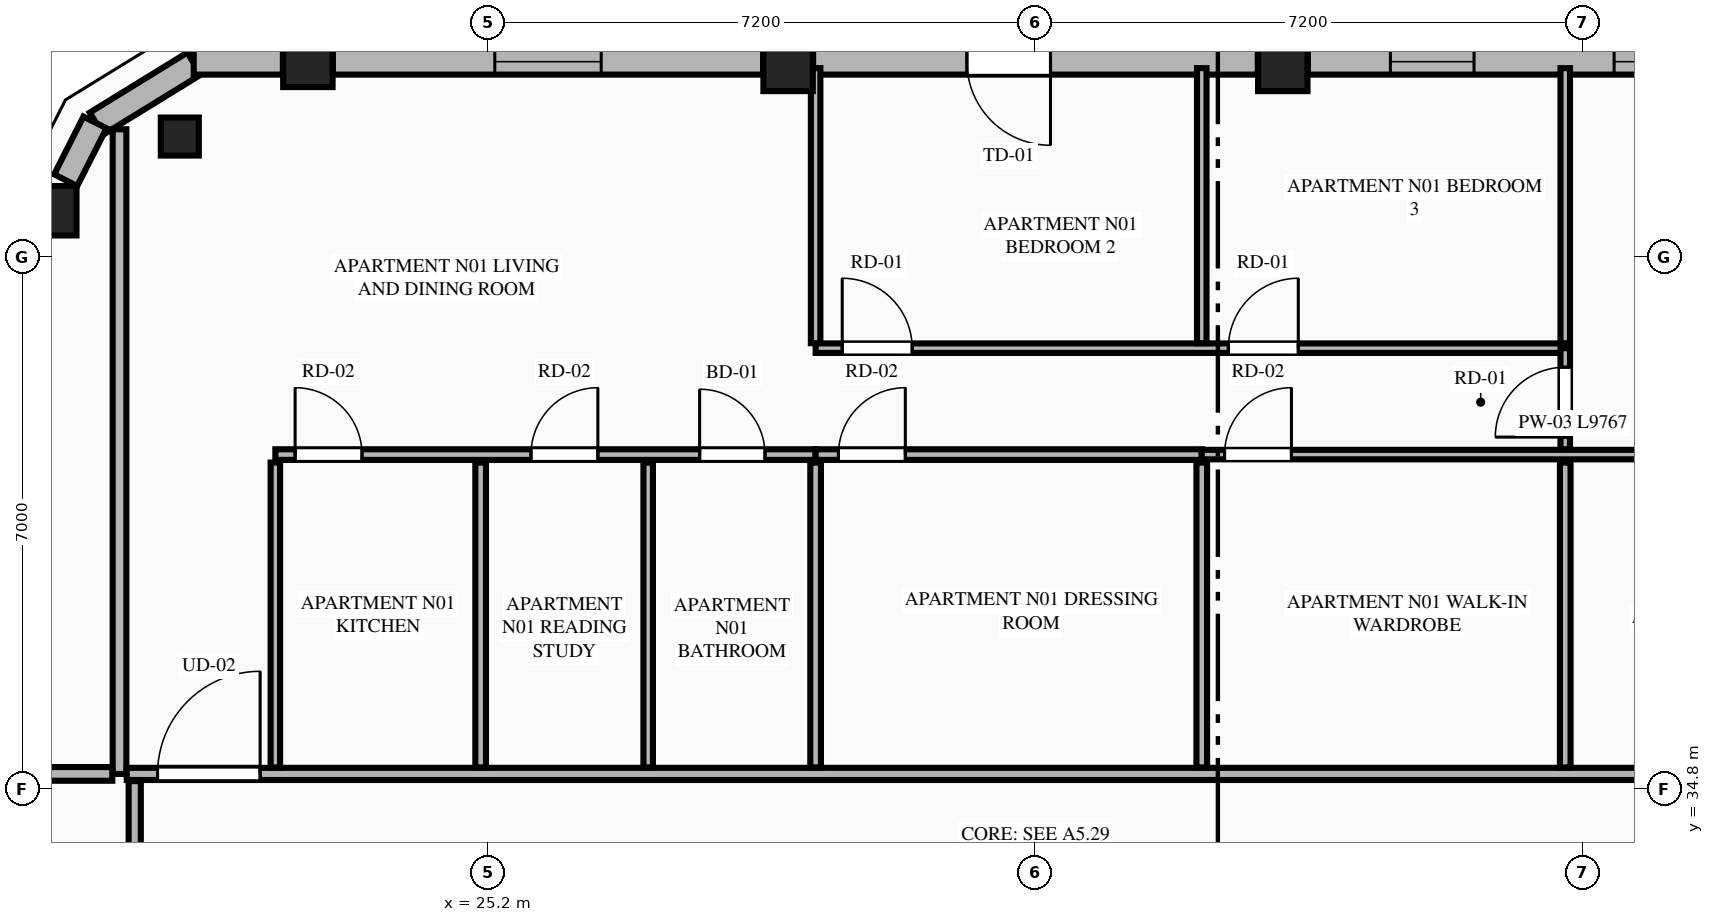
"""IFC4 building model, lengths in metres.
Left out: names, types, materials, properties, quantities, classifications, styles, units other than length and angle.
Written with IfcOpenShell. Run it as: python <this file> out.ifc"""

import sys

from ifc_helpers import new_model, si_unit, direction, frame, frame_2d, origin, origin_2d, place, context, subcontext, project, spatial, rectangle, extrude, element, fill, save


model = new_model("IFC4")
c1 = context("Model", 3, precision=1e-05, world=origin(), true_north=direction((0.0, 1.0)))
c2 = subcontext(c1, "Body", "Model", "MODEL_VIEW")
j1 = project(units=[si_unit("LENGTHUNIT", "METRE"), si_unit("PLANEANGLEUNIT", "RADIAN")], contexts=[c1])
p1 = place(None, origin())
s1 = spatial("IfcSite", under=j1, at=p1, CompositionType="ELEMENT")
p2 = place(p1, origin())
s2 = spatial("IfcBuilding", under=s1, at=p2, CompositionType="ELEMENT")
p3 = place(p2, frame((0.0, 0.0, 263.5)))
s3 = spatial("IfcBuildingStorey", under=s2, at=p3, CompositionType="ELEMENT", Elevation=263.5)
for number, where, z_axis, x_axis in (
    (1, (35.654, 44.308, 0.0), (0.0, 0.0, 1.0), (1.0, 0.0, 0.0)),
    (2, (29.146, 44.308, 0.0), (0.0, 0.0, 1.0), (1.0, 0.0, 0.0)),
    (3, (22.828, 44.361, 0.0), (0.0, 0.0, 1.0), (1.0, 0.0, 0.0)),
    (4, (19.459, 42.409, 0.0), (0.0, 0.0, 1.0), (1.0, 0.0, 0.0)),
):
    element("IfcColumn", number, at=place(p3, frame(where, z_axis=z_axis, x_axis=x_axis)), inside=s3, PredefinedType="COLUMN", context=c2, shape_type="SweptSolid", body=[
        extrude(rectangle(XDim=0.65, YDim=0.65, at=origin_2d()), origin(), (0.0, 0.0, 1.0), 3.65),
    ])
p4 = place(p3, frame((21.143, 43.385, 0.0), z_axis=(0.0, 0.0, 1.0), x_axis=(-0.865256437757, -0.501329529272, 0.0)))
e5 = element("IfcColumn", 5, at=p4, inside=s3, PredefinedType="PILASTER", context=c2, shape_type="SweptSolid", body=[
    extrude(rectangle(XDim=0.5, YDim=0.35, at=origin_2d()), origin(), (0.0, 0.0, 1.0), 3.65),
])
p5 = place(p3, frame((21.331, 44.345, 0.0), z_axis=(0.0, 0.0, 1.0), x_axis=(-0.851680557619, -0.52406128246, 0.0)))
e6 = element("IfcWall", 6, at=p5, inside=s3, PredefinedType="STANDARD", context=c2, shape_type="SweptSolid", body=[
    extrude(rectangle(XDim=1.508, YDim=0.34, at=frame_2d((0.754, 0.0))), origin(), (0.0, 0.0, 1.0), 3.45),
])
p6 = place(p3, frame((41.643, 44.37, 0.0), z_axis=(0.0, 0.0, 1.0), x_axis=(-1.0, 0.0, 0.0)))
e7 = element("IfcWall", 7, at=p6, inside=s3, PredefinedType="STANDARD", context=c2, shape_type="SweptSolid", body=[
    extrude(rectangle(XDim=5.66, YDim=0.34, at=frame_2d((2.83, 0.0))), origin(), (0.0, 0.0, 1.0), 2.983),
])
p7 = place(p6, frame((0.53, 0.0, 0.75)))
e8 = element("IfcOpeningElement", 8, at=p7, cuts=e7, PredefinedType="OPENING", context=c2, shape_type="SweptSolid", body=[
    extrude(rectangle(XDim=1.1, YDim=2.0, at=frame_2d((0.55, 1.0))), frame((0.0, 0.18, 0.0), z_axis=(0.0, -1.0, 0.0), x_axis=(1.0, 0.0, 0.0)), (0.0, 0.0, 1.0), 0.36),
])
p8 = place(p6, frame((3.473, 0.0, 0.75)))
e9 = element("IfcOpeningElement", 9, at=p8, cuts=e7, PredefinedType="OPENING", context=c2, shape_type="SweptSolid", body=[
    extrude(rectangle(XDim=1.1, YDim=2.0, at=frame_2d((0.55, 1.0))), frame((0.0, 0.18, 0.0), z_axis=(0.0, -1.0, 0.0), x_axis=(1.0, 0.0, 0.0)), (0.0, 0.0, 1.0), 0.36),
])
p9 = place(p3, frame((35.325, 44.37, 0.0), z_axis=(0.0, 0.0, 1.0), x_axis=(-1.0, 0.0, 0.0)))
e10 = element("IfcWall", 10, at=p9, inside=s3, PredefinedType="STANDARD", context=c2, shape_type="SweptSolid", body=[
    extrude(rectangle(XDim=5.85, YDim=0.34, at=frame_2d((2.925, 0.0))), origin(), (0.0, 0.0, 1.0), 2.983),
])
p10 = place(p9, frame((2.727, 0.0, 0.0)))
e11 = element("IfcOpeningElement", 11, at=p10, cuts=e10, PredefinedType="OPENING", context=c2, shape_type="SweptSolid", body=[
    extrude(rectangle(XDim=1.1, YDim=2.25, at=frame_2d((0.55, 1.125))), frame((0.0, 0.18, 0.0), z_axis=(0.0, -1.0, 0.0), x_axis=(1.0, 0.0, 0.0)), (0.0, 0.0, 1.0), 0.36),
])
p11 = place(p3, frame((28.817, 44.37, 0.0), z_axis=(0.0, 0.0, 1.0), x_axis=(-1.0, 0.0, 0.0)))
e12 = element("IfcWall", 12, at=p11, inside=s3, PredefinedType="STANDARD", context=c2, shape_type="SweptSolid", body=[
    extrude(rectangle(XDim=5.66, YDim=0.34, at=frame_2d((2.83, 0.0))), origin(), (0.0, 0.0, 1.0), 2.983),
])
p12 = place(p11, frame((2.13, 0.0, 0.75)))
e13 = element("IfcOpeningElement", 13, at=p12, cuts=e12, PredefinedType="OPENING", context=c2, shape_type="SweptSolid", body=[
    extrude(rectangle(XDim=1.4, YDim=2.05, at=frame_2d((0.7, 1.025))), frame((0.0, 0.18, 0.0), z_axis=(0.0, -1.0, 0.0), x_axis=(1.0, 0.0, 0.0)), (0.0, 0.0, 1.0), 0.36),
])
p13 = place(p3, frame((22.499, 44.37, 0.0), z_axis=(0.0, 0.0, 1.0), x_axis=(-1.0, 0.0, 0.0)))
e14 = element("IfcWall", 14, at=p13, inside=s3, PredefinedType="STANDARD", context=c2, shape_type="SweptSolid", body=[
    extrude(rectangle(XDim=1.173, YDim=0.34, at=frame_2d((0.586, 0.0))), origin(), (0.0, 0.0, 1.0), 3.45),
])
p14 = place(p3, frame((20.027, 43.571, 0.0), z_axis=(0.0, 0.0, 1.0), x_axis=(-0.451907025977, -0.8920650424, 0.0)))
e15 = element("IfcWall", 15, at=p14, inside=s3, PredefinedType="STANDARD", context=c2, shape_type="SweptSolid", body=[
    extrude(rectangle(XDim=0.852, YDim=0.34, at=frame_2d((0.426, 0.0))), origin(), (0.0, 0.0, 1.0), 3.45),
])
p15 = place(p3, frame((20.35, 35.0, 0.0), z_axis=(0.0, 0.0, 1.0), x_axis=(0.0, 1.0, 0.0)))
e16 = element("IfcWall", 16, at=p15, inside=s3, PredefinedType="PARTITIONING", context=c2, shape_type="SweptSolid", body=[
    extrude(rectangle(XDim=8.481, YDim=0.18, at=frame_2d((4.24, 0.0))), origin(), (0.0, 0.0, 1.0), 3.45),
])
p16 = place(p3, frame((20.445, 35.0, 0.0), z_axis=(0.0, 0.0, 1.0), x_axis=(1.0, 0.0, 0.0)))
e17 = element("IfcWall", 17, at=p16, inside=s3, PredefinedType="PARTITIONING", context=c2, shape_type="SweptSolid", body=[
    extrude(rectangle(XDim=23.91, YDim=0.16, at=frame_2d((11.955, 0.0))), origin(), (0.0, 0.0, 1.0), 3.45),
])
p17 = place(p16, frame((0.405, 0.0, 0.0)))
e18 = element("IfcOpeningElement", 18, at=p17, cuts=e17, PredefinedType="OPENING", context=c2, shape_type="SweptSolid", body=[
    extrude(rectangle(XDim=1.35, YDim=2.35, at=frame_2d((0.675, 1.175))), frame((0.0, 0.09, 0.0), z_axis=(0.0, -1.0, 0.0), x_axis=(1.0, 0.0, 0.0)), (0.0, 0.0, 1.0), 0.18),
])
p18 = place(p3, frame((22.4, 35.085, 0.0), z_axis=(0.0, 0.0, 1.0), x_axis=(0.0, 1.0, 0.0)))
e19 = element("IfcWall", 19, at=p18, inside=s3, PredefinedType="PARTITIONING", context=c2, shape_type="SweptSolid", body=[
    extrude(rectangle(XDim=4.011, YDim=0.125, at=frame_2d((2.005, 0.0))), origin(), (0.0, 0.0, 1.0), 3.45),
])
p19 = place(p3, frame((22.4, 39.201, 0.0), z_axis=(0.0, 0.0, 1.0), x_axis=(1.0, 0.0, 0.0)))
e20 = element("IfcWall", 20, at=p19, inside=s3, PredefinedType="PLUMBINGWALL", context=c2, shape_type="SweptSolid", body=[
    extrude(rectangle(XDim=7.108, YDim=0.14, at=frame_2d((3.554, 0.0))), origin(), (0.0, 0.0, 1.0), 3.45),
])
p20 = place(p19, frame((5.582, 0.0, 0.0)))
e21 = element("IfcOpeningElement", 21, at=p20, cuts=e20, PredefinedType="OPENING", context=c2, shape_type="SweptSolid", body=[
    extrude(rectangle(XDim=0.86, YDim=2.1, at=frame_2d((0.43, 1.05))), frame((0.0, 0.08, 0.0), z_axis=(0.0, -1.0, 0.0), x_axis=(1.0, 0.0, 0.0)), (0.0, 0.0, 1.0), 0.16),
])
p21 = place(p19, frame((0.26, 0.0, 0.0)))
e22 = element("IfcOpeningElement", 22, at=p21, cuts=e20, PredefinedType="OPENING", context=c2, shape_type="SweptSolid", body=[
    extrude(rectangle(XDim=0.88, YDim=2.15, at=frame_2d((0.44, 1.075))), frame((0.0, 0.08, 0.0), z_axis=(0.0, -1.0, 0.0), x_axis=(1.0, 0.0, 0.0)), (0.0, 0.0, 1.0), 0.16),
])
p22 = place(p19, frame((3.363, 0.0, 0.0)))
e23 = element("IfcOpeningElement", 23, at=p22, cuts=e20, PredefinedType="OPENING", context=c2, shape_type="SweptSolid", body=[
    extrude(rectangle(XDim=0.88, YDim=2.15, at=frame_2d((0.44, 1.075))), frame((0.0, 0.08, 0.0), z_axis=(0.0, -1.0, 0.0), x_axis=(1.0, 0.0, 0.0)), (0.0, 0.0, 1.0), 0.16),
])
p23 = place(p3, frame((29.508, 39.201, 0.0), z_axis=(0.0, 0.0, 1.0), x_axis=(1.0, 0.0, 0.0)))
e24 = element("IfcWall", 24, at=p23, inside=s3, PredefinedType="PLUMBINGWALL", context=c2, shape_type="SweptSolid", body=[
    extrude(rectangle(XDim=5.08, YDim=0.14, at=frame_2d((2.54, 0.0))), origin(), (0.0, 0.0, 1.0), 3.45),
])
p24 = place(p23, frame((0.3, 0.0, 0.0)))
e25 = element("IfcOpeningElement", 25, at=p24, cuts=e24, PredefinedType="OPENING", context=c2, shape_type="SweptSolid", body=[
    extrude(rectangle(XDim=0.88, YDim=2.15, at=frame_2d((0.44, 1.075))), frame((0.0, 0.08, 0.0), z_axis=(0.0, -1.0, 0.0), x_axis=(1.0, 0.0, 0.0)), (0.0, 0.0, 1.0), 0.16),
])
p25 = place(p3, frame((34.588, 39.201, 0.0), z_axis=(0.0, 0.0, 1.0), x_axis=(1.0, 0.0, 0.0)))
e26 = element("IfcWall", 26, at=p25, inside=s3, PredefinedType="PARTITIONING", context=c2, shape_type="SweptSolid", body=[
    extrude(rectangle(XDim=9.767, YDim=0.125, at=frame_2d((4.884, 0.0))), origin(), (0.0, 0.0, 1.0), 3.45),
])
p26 = place(p25, frame((6.849, 0.0, 0.0)))
e27 = element("IfcOpeningElement", 27, at=p26, cuts=e26, PredefinedType="OPENING", context=c2, shape_type="SweptSolid", body=[
    extrude(rectangle(XDim=0.86, YDim=2.1, at=frame_2d((0.43, 1.05))), frame((0.0, 0.073, 0.0), z_axis=(0.0, -1.0, 0.0), x_axis=(1.0, 0.0, 0.0)), (0.0, 0.0, 1.0), 0.145),
])
p27 = place(p25, frame((0.3, 0.0, 0.0)))
e28 = element("IfcOpeningElement", 28, at=p27, cuts=e26, PredefinedType="OPENING", context=c2, shape_type="SweptSolid", body=[
    extrude(rectangle(XDim=0.88, YDim=2.15, at=frame_2d((0.44, 1.075))), frame((0.0, 0.073, 0.0), z_axis=(0.0, -1.0, 0.0), x_axis=(1.0, 0.0, 0.0)), (0.0, 0.0, 1.0), 0.145),
])
p28 = place(p3, frame((25.101, 35.085, 0.0), z_axis=(0.0, 0.0, 1.0), x_axis=(0.0, 1.0, 0.0)))
e29 = element("IfcWall", 29, at=p28, inside=s3, PredefinedType="PLUMBINGWALL", context=c2, shape_type="SweptSolid", body=[
    extrude(rectangle(XDim=4.011, YDim=0.14, at=frame_2d((2.005, 0.0))), origin(), (0.0, 0.0, 1.0), 3.45),
])
p29 = place(p3, frame((27.305, 35.085, 0.0), z_axis=(0.0, 0.0, 1.0), x_axis=(0.0, 1.0, 0.0)))
e30 = element("IfcWall", 30, at=p29, inside=s3, PredefinedType="PARTITIONING", context=c2, shape_type="SweptSolid", body=[
    extrude(rectangle(XDim=4.011, YDim=0.125, at=frame_2d((2.005, 0.0))), origin(), (0.0, 0.0, 1.0), 3.45),
])
p30 = place(p3, frame((29.508, 40.666, 0.0), z_axis=(0.0, 0.0, 1.0), x_axis=(0.0, 1.0, 0.0)))
e31 = element("IfcWall", 31, at=p30, inside=s3, PredefinedType="PARTITIONING", context=c2, shape_type="SweptSolid", body=[
    extrude(rectangle(XDim=3.619, YDim=0.125, at=frame_2d((1.81, 0.0))), origin(), (0.0, 0.0, 1.0), 3.45),
])
p31 = place(p3, frame((29.508, 40.601, 0.0), z_axis=(0.0, 0.0, 1.0), x_axis=(1.0, 0.0, 0.0)))
e32 = element("IfcWall", 32, at=p31, inside=s3, PredefinedType="PARTITIONING", context=c2, shape_type="SweptSolid", body=[
    extrude(rectangle(XDim=9.862, YDim=0.125, at=frame_2d((4.931, 0.0))), origin(), (0.0, 0.0, 1.0), 3.45),
])
p32 = place(p31, frame((0.35, 0.0, 0.0)))
e33 = element("IfcOpeningElement", 33, at=p32, cuts=e32, PredefinedType="OPENING", context=c2, shape_type="SweptSolid", body=[
    extrude(rectangle(XDim=0.92, YDim=2.15, at=frame_2d((0.46, 1.075))), frame((0.0, 0.073, 0.0), z_axis=(0.0, -1.0, 0.0), x_axis=(1.0, 0.0, 0.0)), (0.0, 0.0, 1.0), 0.145),
])
p33 = place(p31, frame((5.43, 0.0, 0.0)))
e34 = element("IfcOpeningElement", 34, at=p33, cuts=e32, PredefinedType="OPENING", context=c2, shape_type="SweptSolid", body=[
    extrude(rectangle(XDim=0.92, YDim=2.15, at=frame_2d((0.46, 1.075))), frame((0.0, 0.073, 0.0), z_axis=(0.0, -1.0, 0.0), x_axis=(1.0, 0.0, 0.0)), (0.0, 0.0, 1.0), 0.145),
])
p34 = place(p3, frame((39.37, 39.271, 0.0), z_axis=(0.0, 0.0, 1.0), x_axis=(0.0, 1.0, 0.0)))
e35 = element("IfcWall", 35, at=p34, inside=s3, PredefinedType="PARTITIONING", context=c2, shape_type="SweptSolid", body=[
    extrude(rectangle(XDim=1.33, YDim=0.125, at=frame_2d((0.665, 0.0))), origin(), (0.0, 0.0, 1.0), 3.45),
])
p35 = place(p34, frame((0.16, 0.0, 0.0)))
e36 = element("IfcOpeningElement", 36, at=p35, cuts=e35, PredefinedType="OPENING", context=c2, shape_type="SweptSolid", body=[
    extrude(rectangle(XDim=0.92, YDim=2.15, at=frame_2d((0.46, 1.075))), frame((0.0, 0.073, 0.0), z_axis=(0.0, -1.0, 0.0), x_axis=(1.0, 0.0, 0.0)), (0.0, 0.0, 1.0), 0.145),
])
for number, where, z_axis, x_axis in (
    (37, (29.508, 35.085, 0.0), (0.0, 0.0, 1.0), (0.0, 1.0, 0.0)),
    (38, (34.588, 35.085, 0.0), (0.0, 0.0, 1.0), (0.0, 1.0, 0.0)),
):
    element("IfcWall", number, at=place(p3, frame(where, z_axis=z_axis, x_axis=x_axis)), inside=s3, PredefinedType="PLUMBINGWALL", context=c2, shape_type="SweptSolid", body=[
        extrude(rectangle(XDim=4.011, YDim=0.14, at=frame_2d((2.005, 0.0))), origin(), (0.0, 0.0, 1.0), 3.45),
    ])
for number, where, z_axis, x_axis in (
    (39, (34.588, 40.666, 0.0), (0.0, 0.0, 1.0), (0.0, 1.0, 0.0)),
    (40, (39.37, 40.666, 0.0), (0.0, 0.0, 1.0), (0.0, 1.0, 0.0)),
):
    element("IfcWall", number, at=place(p3, frame(where, z_axis=z_axis, x_axis=x_axis)), inside=s3, PredefinedType="PARTITIONING", context=c2, shape_type="SweptSolid", body=[
        extrude(rectangle(XDim=3.619, YDim=0.125, at=frame_2d((1.81, 0.0))), origin(), (0.0, 0.0, 1.0), 3.45),
    ])
p36 = place(p3, frame((39.37, 35.085, 0.0), z_axis=(0.0, 0.0, 1.0), x_axis=(0.0, 1.0, 0.0)))
e41 = element("IfcWall", 41, at=p36, inside=s3, PredefinedType="PLUMBINGWALL", context=c2, shape_type="SweptSolid", body=[
    extrude(rectangle(XDim=4.011, YDim=0.14, at=frame_2d((2.005, 0.0))), origin(), (0.0, 0.0, 1.0), 3.45),
])
p37 = place(p3, frame((15.933, 35.0, 0.0), z_axis=(0.0, 0.0, 1.0), x_axis=(1.0, 0.0, 0.0)))
e42 = element("IfcWall", 42, at=p37, inside=s3, PredefinedType="PARTITIONING", context=c2, shape_type="SweptSolid", body=[
    extrude(rectangle(XDim=4.322, YDim=0.18, at=frame_2d((2.161, 0.0))), origin(), (0.0, 0.0, 1.0), 3.45),
])
p38 = place(p3, frame((20.55, 16.495, 0.0), z_axis=(0.0, 0.0, 1.0), x_axis=(0.0, 1.0, 0.0)))
e43 = element("IfcWall", 43, at=p38, inside=s3, PredefinedType="PARTITIONING", context=c2, shape_type="SweptSolid", body=[
    extrude(rectangle(XDim=18.41, YDim=0.16, at=frame_2d((9.205, 0.0))), origin(), (0.0, 0.0, 1.0), 3.137),
])
p39 = place(p38, frame((0.4, 0.0, 0.0)))
e44 = element("IfcOpeningElement", 44, at=p39, cuts=e43, PredefinedType="OPENING", context=c2, shape_type="SweptSolid", body=[
    extrude(rectangle(XDim=1.02, YDim=2.25, at=frame_2d((0.51, 1.125))), frame((0.0, 0.09, 0.0), z_axis=(0.0, -1.0, 0.0), x_axis=(1.0, 0.0, 0.0)), (0.0, 0.0, 1.0), 0.18),
])
p40 = place(p7, origin())
e45 = element("IfcWindow", 45, at=p40, inside=s3, PartitioningType="SINGLE_PANEL", PredefinedType="WINDOW", context=c2, shape_type="SweptSolid", body=[
    extrude(rectangle(XDim=1.1, YDim=2.0, at=frame_2d((0.55, 1.0))), frame((0.0, 0.03, 0.0), z_axis=(0.0, -1.0, 0.0), x_axis=(1.0, 0.0, 0.0)), (0.0, 0.0, 1.0), 0.06),
])
fill(e8, e45)
p41 = place(p10, origin())
e46 = element("IfcDoor", 46, at=p41, inside=s3, OperationType="SINGLE_SWING_LEFT", PredefinedType="DOOR", context=c2, shape_type="SweptSolid", body=[
    extrude(rectangle(XDim=1.1, YDim=2.25, at=frame_2d((0.55, 1.125))), frame((0.0, 0.025, 0.0), z_axis=(0.0, -1.0, 0.0), x_axis=(1.0, 0.0, 0.0)), (0.0, 0.0, 1.0), 0.05),
])
fill(e11, e46)
p42 = place(p12, origin())
e47 = element("IfcWindow", 47, at=p42, inside=s3, PartitioningType="SINGLE_PANEL", PredefinedType="WINDOW", context=c2, shape_type="SweptSolid", body=[
    extrude(rectangle(XDim=1.4, YDim=2.05, at=frame_2d((0.7, 1.025))), frame((0.0, 0.03, 0.0), z_axis=(0.0, -1.0, 0.0), x_axis=(1.0, 0.0, 0.0)), (0.0, 0.0, 1.0), 0.06),
])
fill(e13, e47)
p43 = place(p20, origin())
e48 = element("IfcDoor", 48, at=p43, inside=s3, OperationType="SINGLE_SWING_LEFT", PredefinedType="DOOR", context=c2, shape_type="SweptSolid", body=[
    extrude(rectangle(XDim=0.86, YDim=2.1, at=frame_2d((0.43, 1.05))), frame((0.0, 0.025, 0.0), z_axis=(0.0, -1.0, 0.0), x_axis=(1.0, 0.0, 0.0)), (0.0, 0.0, 1.0), 0.05),
])
fill(e21, e48)
p44 = place(p17, origin())
e49 = element("IfcDoor", 49, at=p44, inside=s3, OperationType="SINGLE_SWING_RIGHT", PredefinedType="DOOR", context=c2, shape_type="SweptSolid", body=[
    extrude(rectangle(XDim=1.35, YDim=2.35, at=frame_2d((0.675, 1.175))), frame((0.0, 0.025, 0.0), z_axis=(0.0, -1.0, 0.0), x_axis=(1.0, 0.0, 0.0)), (0.0, 0.0, 1.0), 0.05),
])
fill(e18, e49)
p45 = place(p21, origin())
e50 = element("IfcDoor", 50, at=p45, inside=s3, OperationType="SINGLE_SWING_LEFT", PredefinedType="DOOR", context=c2, shape_type="SweptSolid", body=[
    extrude(rectangle(XDim=0.88, YDim=2.15, at=frame_2d((0.44, 1.075))), frame((0.0, 0.025, 0.0), z_axis=(0.0, -1.0, 0.0), x_axis=(1.0, 0.0, 0.0)), (0.0, 0.0, 1.0), 0.05),
])
fill(e22, e50)
p46 = place(p22, origin())
e51 = element("IfcDoor", 51, at=p46, inside=s3, OperationType="SINGLE_SWING_RIGHT", PredefinedType="DOOR", context=c2, shape_type="SweptSolid", body=[
    extrude(rectangle(XDim=0.88, YDim=2.15, at=frame_2d((0.44, 1.075))), frame((0.0, 0.025, 0.0), z_axis=(0.0, -1.0, 0.0), x_axis=(1.0, 0.0, 0.0)), (0.0, 0.0, 1.0), 0.05),
])
fill(e23, e51)
p47 = place(p24, origin())
e52 = element("IfcDoor", 52, at=p47, inside=s3, OperationType="SINGLE_SWING_RIGHT", PredefinedType="DOOR", context=c2, shape_type="SweptSolid", body=[
    extrude(rectangle(XDim=0.88, YDim=2.15, at=frame_2d((0.44, 1.075))), frame((0.0, 0.025, 0.0), z_axis=(0.0, -1.0, 0.0), x_axis=(1.0, 0.0, 0.0)), (0.0, 0.0, 1.0), 0.05),
])
fill(e25, e52)
p48 = place(p32, origin())
e53 = element("IfcDoor", 53, at=p48, inside=s3, OperationType="SINGLE_SWING_LEFT", PredefinedType="DOOR", context=c2, shape_type="SweptSolid", body=[
    extrude(rectangle(XDim=0.92, YDim=2.15, at=frame_2d((0.46, 1.075))), frame((0.0, 0.025, 0.0), z_axis=(0.0, -1.0, 0.0), x_axis=(1.0, 0.0, 0.0)), (0.0, 0.0, 1.0), 0.05),
])
fill(e33, e53)
p49 = place(p33, origin())
e54 = element("IfcDoor", 54, at=p49, inside=s3, OperationType="SINGLE_SWING_RIGHT", PredefinedType="DOOR", context=c2, shape_type="SweptSolid", body=[
    extrude(rectangle(XDim=0.92, YDim=2.15, at=frame_2d((0.46, 1.075))), frame((0.0, 0.025, 0.0), z_axis=(0.0, -1.0, 0.0), x_axis=(1.0, 0.0, 0.0)), (0.0, 0.0, 1.0), 0.05),
])
fill(e34, e54)
p50 = place(p35, origin())
e55 = element("IfcDoor", 55, at=p50, inside=s3, OperationType="SINGLE_SWING_LEFT", PredefinedType="DOOR", context=c2, shape_type="SweptSolid", body=[
    extrude(rectangle(XDim=0.92, YDim=2.15, at=frame_2d((0.46, 1.075))), frame((0.0, 0.025, 0.0), z_axis=(0.0, -1.0, 0.0), x_axis=(1.0, 0.0, 0.0)), (0.0, 0.0, 1.0), 0.05),
])
fill(e36, e55)
p51 = place(p27, origin())
e56 = element("IfcDoor", 56, at=p51, inside=s3, OperationType="SINGLE_SWING_RIGHT", PredefinedType="DOOR", context=c2, shape_type="SweptSolid", body=[
    extrude(rectangle(XDim=0.88, YDim=2.15, at=frame_2d((0.44, 1.075))), frame((0.0, 0.025, 0.0), z_axis=(0.0, -1.0, 0.0), x_axis=(1.0, 0.0, 0.0)), (0.0, 0.0, 1.0), 0.05),
])
fill(e28, e56)
p52 = place(p8, origin())
e57 = element("IfcWindow", 57, at=p52, inside=s3, PartitioningType="SINGLE_PANEL", PredefinedType="WINDOW", context=c2, shape_type="SweptSolid", body=[
    extrude(rectangle(XDim=1.1, YDim=2.0, at=frame_2d((0.55, 1.0))), frame((0.0, 0.03, 0.0), z_axis=(0.0, -1.0, 0.0), x_axis=(1.0, 0.0, 0.0)), (0.0, 0.0, 1.0), 0.06),
])
fill(e9, e57)
save(model, sys.argv[1])
